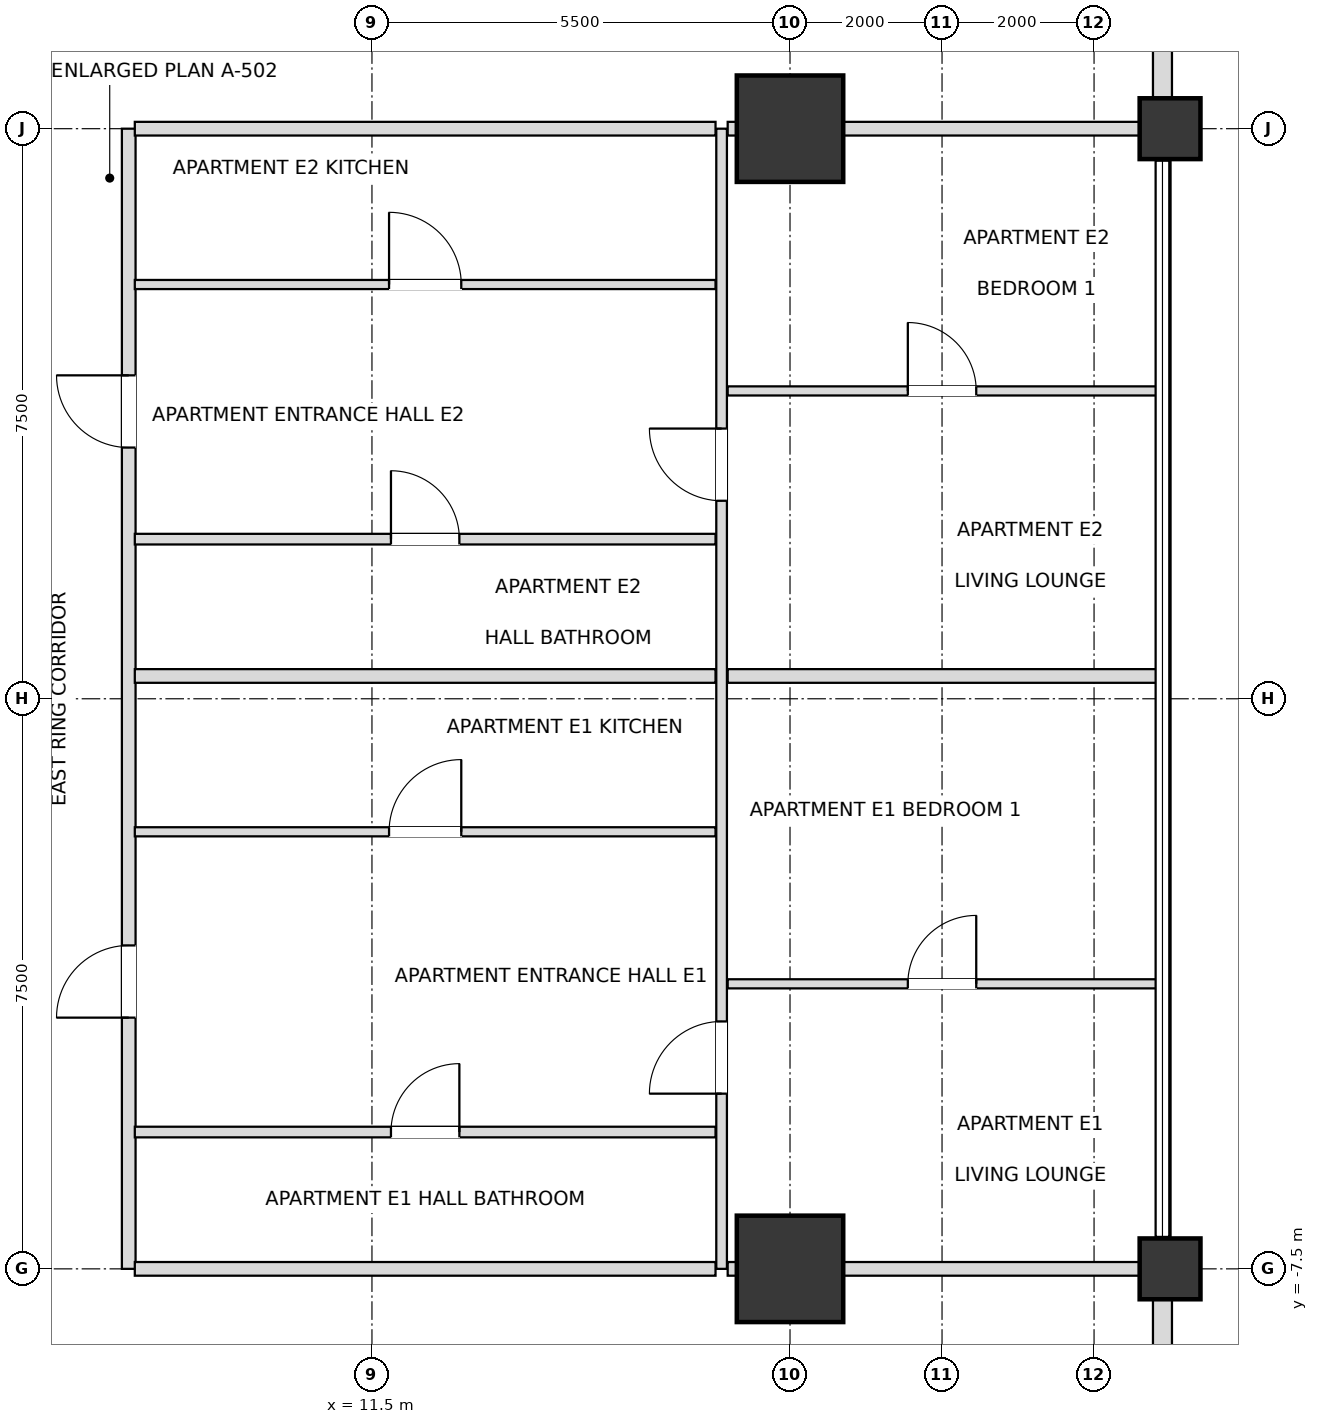
"""IFC4 building model, lengths in metres.
Left out: names, types, materials, properties, quantities, classifications, styles, units other than length and angle.
Written with IfcOpenShell. Run it as: python <this file> out.ifc"""

import sys

from ifc_helpers import new_model, si_unit, direction, frame, frame_2d, origin, origin_2d, place, context, subcontext, project, spatial, rectangle, extrude, element, fill, save


model = new_model("IFC4")
c1 = context("Model", 3, precision=1e-05, world=origin(), true_north=direction((0.0, 1.0)))
c2 = subcontext(c1, "Body", "Model", "MODEL_VIEW")
j1 = project(units=[si_unit("LENGTHUNIT", "METRE"), si_unit("PLANEANGLEUNIT", "RADIAN")], contexts=[c1])
p1 = place(None, origin())
s1 = spatial("IfcSite", under=j1, at=p1, CompositionType="ELEMENT")
p2 = place(p1, origin())
s2 = spatial("IfcBuilding", under=s1, at=p2, CompositionType="ELEMENT")
p3 = place(p2, frame((0.0, 0.0, 75.6)))
s3 = spatial("IfcBuildingStorey", under=s2, at=p3, CompositionType="ELEMENT", Elevation=75.6)
for number, where, z_axis, x_axis in (
    (1, (17.0, -7.5, 0.0), (0.0, 0.0, 1.0), (1.0, 0.0, 0.0)),
    (2, (17.0, 7.5, 0.0), (0.0, 0.0, 1.0), (1.0, 0.0, 0.0)),
):
    element("IfcColumn", number, at=place(p3, frame(where, z_axis=z_axis, x_axis=x_axis)), inside=s3, PredefinedType="USERDEFINED", context=c2, shape_type="SweptSolid", body=[
        extrude(rectangle(XDim=1.4, YDim=1.4, at=origin_2d()), origin(), (0.0, 0.0, 1.0), 3.6),
    ])
for number, where, z_axis, x_axis in (
    (3, (22.0, -7.5, 0.0), (0.0, 0.0, 1.0), (1.0, 0.0, 0.0)),
    (4, (22.0, 7.5, 0.0), (0.0, 0.0, 1.0), (1.0, 0.0, 0.0)),
):
    element("IfcColumn", number, at=place(p3, frame(where, z_axis=z_axis, x_axis=x_axis)), inside=s3, PredefinedType="COLUMN", context=c2, shape_type="SweptSolid", body=[
        extrude(rectangle(XDim=0.8, YDim=0.8, at=origin_2d()), origin(), (0.0, 0.0, 1.0), 3.6),
    ])
p4 = place(p3, frame((21.9, -12.605, 0.0), z_axis=(0.0, 0.0, 1.0), x_axis=(0.0, 1.0, 0.0)))
e5 = element("IfcWall", 5, at=p4, inside=s3, PredefinedType="SOLIDWALL", context=c2, shape_type="SweptSolid", body=[
    extrude(rectangle(XDim=4.71, YDim=0.25, at=frame_2d((2.355, 0.0))), origin(), (0.0, 0.0, 1.0), 2.736),
])
p5 = place(p4, frame((1.455, 0.0, 0.72)))
e6 = element("IfcOpeningElement", 6, at=p5, cuts=e5, PredefinedType="OPENING", context=c2, shape_type="SweptSolid", body=[
    extrude(rectangle(XDim=1.8, YDim=1.68, at=frame_2d((0.9, 0.84))), frame((0.0, 0.135, 0.0), z_axis=(0.0, -1.0, 0.0), x_axis=(1.0, 0.0, 0.0)), (0.0, 0.0, 1.0), 0.27),
])
p6 = place(p3, frame((21.9, 7.895, 0.0), z_axis=(0.0, 0.0, 1.0), x_axis=(0.0, 1.0, 0.0)))
e7 = element("IfcWall", 7, at=p6, inside=s3, PredefinedType="SOLIDWALL", context=c2, shape_type="SweptSolid", body=[
    extrude(rectangle(XDim=4.71, YDim=0.25, at=frame_2d((2.355, 0.0))), origin(), (0.0, 0.0, 1.0), 2.736),
])
p7 = place(p6, frame((1.455, 0.0, 0.72)))
e8 = element("IfcOpeningElement", 8, at=p7, cuts=e7, PredefinedType="OPENING", context=c2, shape_type="SweptSolid", body=[
    extrude(rectangle(XDim=1.8, YDim=1.68, at=frame_2d((0.9, 0.84))), frame((0.0, 0.135, 0.0), z_axis=(0.0, -1.0, 0.0), x_axis=(1.0, 0.0, 0.0)), (0.0, 0.0, 1.0), 0.27),
])
p8 = place(p3, frame((8.3, -7.5, 0.0), z_axis=(0.0, 0.0, 1.0), x_axis=(0.0, 1.0, 0.0)))
e9 = element("IfcWall", 9, at=p8, inside=s3, PredefinedType="PARTITIONING", context=c2, shape_type="SweptSolid", body=[
    extrude(rectangle(XDim=15.0, YDim=0.18, at=frame_2d((7.5, 0.0))), origin(), (0.0, 0.0, 1.0), 3.38),
])
p9 = place(p8, frame((3.305, 0.0, 0.0)))
e10 = element("IfcOpeningElement", 10, at=p9, cuts=e9, PredefinedType="OPENING", context=c2, shape_type="SweptSolid", body=[
    extrude(rectangle(XDim=0.95, YDim=2.15, at=frame_2d((0.475, 1.075))), frame((0.0, 0.1, 0.0), z_axis=(0.0, -1.0, 0.0), x_axis=(1.0, 0.0, 0.0)), (0.0, 0.0, 1.0), 0.2),
])
p10 = place(p8, frame((10.805, 0.0, 0.0)))
e11 = element("IfcOpeningElement", 11, at=p10, cuts=e9, PredefinedType="OPENING", context=c2, shape_type="SweptSolid", body=[
    extrude(rectangle(XDim=0.95, YDim=2.15, at=frame_2d((0.475, 1.075))), frame((0.0, 0.1, 0.0), z_axis=(0.0, -1.0, 0.0), x_axis=(1.0, 0.0, 0.0)), (0.0, 0.0, 1.0), 0.2),
])
p11 = place(p3, frame((16.1, -7.5, 0.0), z_axis=(0.0, 0.0, 1.0), x_axis=(0.0, 1.0, 0.0)))
e12 = element("IfcWall", 12, at=p11, inside=s3, PredefinedType="PARTITIONING", context=c2, shape_type="SweptSolid", body=[
    extrude(rectangle(XDim=15.0, YDim=0.14, at=frame_2d((7.5, 0.0))), origin(), (0.0, 0.0, 1.0), 3.38),
])
p12 = place(p11, frame((2.305, 0.0, 0.0)))
e13 = element("IfcOpeningElement", 13, at=p12, cuts=e12, PredefinedType="OPENING", context=c2, shape_type="SweptSolid", body=[
    extrude(rectangle(XDim=0.95, YDim=2.1, at=frame_2d((0.475, 1.05))), frame((0.0, 0.08, 0.0), z_axis=(0.0, -1.0, 0.0), x_axis=(1.0, 0.0, 0.0)), (0.0, 0.0, 1.0), 0.16),
])
p13 = place(p11, frame((10.105, 0.0, 0.0)))
e14 = element("IfcOpeningElement", 14, at=p13, cuts=e12, PredefinedType="OPENING", context=c2, shape_type="SweptSolid", body=[
    extrude(rectangle(XDim=0.95, YDim=2.1, at=frame_2d((0.475, 1.05))), frame((0.0, 0.08, 0.0), z_axis=(0.0, -1.0, 0.0), x_axis=(1.0, 0.0, 0.0)), (0.0, 0.0, 1.0), 0.16),
])
p14 = place(p3, frame((8.38, -7.5, 0.0), z_axis=(0.0, 0.0, 1.0), x_axis=(1.0, 0.0, 0.0)))
e15 = element("IfcWall", 15, at=p14, inside=s3, PredefinedType="PARTITIONING", context=c2, shape_type="SweptSolid", body=[
    extrude(rectangle(XDim=7.64, YDim=0.18, at=frame_2d((3.82, 0.0))), origin(), (0.0, 0.0, 1.0), 2.816),
])
p15 = place(p3, frame((16.18, -7.5, 0.0), z_axis=(0.0, 0.0, 1.0), x_axis=(1.0, 0.0, 0.0)))
e16 = element("IfcWall", 16, at=p15, inside=s3, PredefinedType="PARTITIONING", context=c2, shape_type="SweptSolid", body=[
    extrude(rectangle(XDim=5.72, YDim=0.18, at=frame_2d((2.86, 0.0))), origin(), (0.0, 0.0, 1.0), 2.816),
])
p16 = place(p3, frame((8.38, -5.7, 0.0), z_axis=(0.0, 0.0, 1.0), x_axis=(1.0, 0.0, 0.0)))
e17 = element("IfcWall", 17, at=p16, inside=s3, PredefinedType="PARTITIONING", context=c2, shape_type="SweptSolid", body=[
    extrude(rectangle(XDim=7.64, YDim=0.14, at=frame_2d((3.82, 0.0))), origin(), (0.0, 0.0, 1.0), 2.948),
])
p17 = place(p16, frame((3.37, 0.0, 0.0)))
e18 = element("IfcOpeningElement", 18, at=p17, cuts=e17, PredefinedType="OPENING", context=c2, shape_type="SweptSolid", body=[
    extrude(rectangle(XDim=0.9, YDim=2.1, at=frame_2d((0.45, 1.05))), frame((0.0, 0.08, 0.0), z_axis=(0.0, -1.0, 0.0), x_axis=(1.0, 0.0, 0.0)), (0.0, 0.0, 1.0), 0.16),
])
p18 = place(p3, frame((16.18, -3.75, 0.0), z_axis=(0.0, 0.0, 1.0), x_axis=(1.0, 0.0, 0.0)))
e19 = element("IfcWall", 19, at=p18, inside=s3, PredefinedType="PARTITIONING", context=c2, shape_type="SweptSolid", body=[
    extrude(rectangle(XDim=5.64, YDim=0.12, at=frame_2d((2.82, 0.0))), origin(), (0.0, 0.0, 1.0), 2.816),
])
p19 = place(p18, frame((2.37, 0.0, 0.0)))
e20 = element("IfcOpeningElement", 20, at=p19, cuts=e19, PredefinedType="OPENING", context=c2, shape_type="SweptSolid", body=[
    extrude(rectangle(XDim=0.9, YDim=2.1, at=frame_2d((0.45, 1.05))), frame((0.0, 0.07, 0.0), z_axis=(0.0, -1.0, 0.0), x_axis=(1.0, 0.0, 0.0)), (0.0, 0.0, 1.0), 0.14),
])
p20 = place(p3, frame((8.38, -1.75, 0.0), z_axis=(0.0, 0.0, 1.0), x_axis=(1.0, 0.0, 0.0)))
e21 = element("IfcWall", 21, at=p20, inside=s3, PredefinedType="PARTITIONING", context=c2, shape_type="SweptSolid", body=[
    extrude(rectangle(XDim=7.64, YDim=0.12, at=frame_2d((3.82, 0.0))), origin(), (0.0, 0.0, 1.0), 2.948),
])
p21 = place(p20, frame((3.345, 0.0, 0.0)))
e22 = element("IfcOpeningElement", 22, at=p21, cuts=e21, PredefinedType="OPENING", context=c2, shape_type="SweptSolid", body=[
    extrude(rectangle(XDim=0.95, YDim=2.1, at=frame_2d((0.475, 1.05))), frame((0.0, 0.07, 0.0), z_axis=(0.0, -1.0, 0.0), x_axis=(1.0, 0.0, 0.0)), (0.0, 0.0, 1.0), 0.14),
])
p22 = place(p3, frame((8.38, 0.3, 0.0), z_axis=(0.0, 0.0, 1.0), x_axis=(1.0, 0.0, 0.0)))
e23 = element("IfcWall", 23, at=p22, inside=s3, PredefinedType="PARTITIONING", context=c2, shape_type="SweptSolid", body=[
    extrude(rectangle(XDim=7.64, YDim=0.18, at=frame_2d((3.82, 0.0))), origin(), (0.0, 0.0, 1.0), 2.948),
])
p23 = place(p3, frame((16.18, 0.3, 0.0), z_axis=(0.0, 0.0, 1.0), x_axis=(1.0, 0.0, 0.0)))
e24 = element("IfcWall", 24, at=p23, inside=s3, PredefinedType="PARTITIONING", context=c2, shape_type="SweptSolid", body=[
    extrude(rectangle(XDim=5.64, YDim=0.18, at=frame_2d((2.82, 0.0))), origin(), (0.0, 0.0, 1.0), 2.816),
])
p24 = place(p3, frame((8.38, 2.1, 0.0), z_axis=(0.0, 0.0, 1.0), x_axis=(1.0, 0.0, 0.0)))
e25 = element("IfcWall", 25, at=p24, inside=s3, PredefinedType="PARTITIONING", context=c2, shape_type="SweptSolid", body=[
    extrude(rectangle(XDim=7.64, YDim=0.14, at=frame_2d((3.82, 0.0))), origin(), (0.0, 0.0, 1.0), 2.948),
])
p25 = place(p24, frame((3.37, 0.0, 0.0)))
e26 = element("IfcOpeningElement", 26, at=p25, cuts=e25, PredefinedType="OPENING", context=c2, shape_type="SweptSolid", body=[
    extrude(rectangle(XDim=0.9, YDim=2.1, at=frame_2d((0.45, 1.05))), frame((0.0, 0.08, 0.0), z_axis=(0.0, -1.0, 0.0), x_axis=(1.0, 0.0, 0.0)), (0.0, 0.0, 1.0), 0.16),
])
p26 = place(p3, frame((16.18, 4.05, 0.0), z_axis=(0.0, 0.0, 1.0), x_axis=(1.0, 0.0, 0.0)))
e27 = element("IfcWall", 27, at=p26, inside=s3, PredefinedType="PARTITIONING", context=c2, shape_type="SweptSolid", body=[
    extrude(rectangle(XDim=5.64, YDim=0.12, at=frame_2d((2.82, 0.0))), origin(), (0.0, 0.0, 1.0), 2.816),
])
p27 = place(p26, frame((2.37, 0.0, 0.0)))
e28 = element("IfcOpeningElement", 28, at=p27, cuts=e27, PredefinedType="OPENING", context=c2, shape_type="SweptSolid", body=[
    extrude(rectangle(XDim=0.9, YDim=2.1, at=frame_2d((0.45, 1.05))), frame((0.0, 0.07, 0.0), z_axis=(0.0, -1.0, 0.0), x_axis=(1.0, 0.0, 0.0)), (0.0, 0.0, 1.0), 0.14),
])
p28 = place(p3, frame((8.38, 5.45, 0.0), z_axis=(0.0, 0.0, 1.0), x_axis=(1.0, 0.0, 0.0)))
e29 = element("IfcWall", 29, at=p28, inside=s3, PredefinedType="PARTITIONING", context=c2, shape_type="SweptSolid", body=[
    extrude(rectangle(XDim=7.64, YDim=0.12, at=frame_2d((3.82, 0.0))), origin(), (0.0, 0.0, 1.0), 2.948),
])
p29 = place(p28, frame((3.345, 0.0, 0.0)))
e30 = element("IfcOpeningElement", 30, at=p29, cuts=e29, PredefinedType="OPENING", context=c2, shape_type="SweptSolid", body=[
    extrude(rectangle(XDim=0.95, YDim=2.1, at=frame_2d((0.475, 1.05))), frame((0.0, 0.07, 0.0), z_axis=(0.0, -1.0, 0.0), x_axis=(1.0, 0.0, 0.0)), (0.0, 0.0, 1.0), 0.14),
])
p30 = place(p3, frame((8.38, 7.5, 0.0), z_axis=(0.0, 0.0, 1.0), x_axis=(1.0, 0.0, 0.0)))
e31 = element("IfcWall", 31, at=p30, inside=s3, PredefinedType="PARTITIONING", context=c2, shape_type="SweptSolid", body=[
    extrude(rectangle(XDim=7.64, YDim=0.18, at=frame_2d((3.82, 0.0))), origin(), (0.0, 0.0, 1.0), 2.816),
])
p31 = place(p3, frame((16.18, 7.5, 0.0), z_axis=(0.0, 0.0, 1.0), x_axis=(1.0, 0.0, 0.0)))
e32 = element("IfcWall", 32, at=p31, inside=s3, PredefinedType="PARTITIONING", context=c2, shape_type="SweptSolid", body=[
    extrude(rectangle(XDim=5.72, YDim=0.18, at=frame_2d((2.86, 0.0))), origin(), (0.0, 0.0, 1.0), 2.816),
])
p32 = place(p17, origin())
e33 = element("IfcDoor", 33, at=p32, inside=s3, OperationType="SINGLE_SWING_RIGHT", PredefinedType="DOOR", context=c2, shape_type="SweptSolid", body=[
    extrude(rectangle(XDim=0.9, YDim=2.1, at=frame_2d((0.45, 1.05))), frame((0.0, 0.025, 0.0), z_axis=(0.0, -1.0, 0.0), x_axis=(1.0, 0.0, 0.0)), (0.0, 0.0, 1.0), 0.05),
])
fill(e18, e33)
p33 = place(p9, origin())
e34 = element("IfcDoor", 34, at=p33, inside=s3, OperationType="SINGLE_SWING_LEFT", PredefinedType="DOOR", context=c2, shape_type="SweptSolid", body=[
    extrude(rectangle(XDim=0.95, YDim=2.15, at=frame_2d((0.475, 1.075))), frame((0.0, 0.025, 0.0), z_axis=(0.0, -1.0, 0.0), x_axis=(1.0, 0.0, 0.0)), (0.0, 0.0, 1.0), 0.05),
])
fill(e10, e34)
p34 = place(p21, origin())
e35 = element("IfcDoor", 35, at=p34, inside=s3, OperationType="SINGLE_SWING_RIGHT", PredefinedType="DOOR", context=c2, shape_type="SweptSolid", body=[
    extrude(rectangle(XDim=0.95, YDim=2.1, at=frame_2d((0.475, 1.05))), frame((0.0, 0.025, 0.0), z_axis=(0.0, -1.0, 0.0), x_axis=(1.0, 0.0, 0.0)), (0.0, 0.0, 1.0), 0.05),
])
fill(e22, e35)
p35 = place(p12, origin())
e36 = element("IfcDoor", 36, at=p35, inside=s3, OperationType="SINGLE_SWING_LEFT", PredefinedType="DOOR", context=c2, shape_type="SweptSolid", body=[
    extrude(rectangle(XDim=0.95, YDim=2.1, at=frame_2d((0.475, 1.05))), frame((0.0, 0.025, 0.0), z_axis=(0.0, -1.0, 0.0), x_axis=(1.0, 0.0, 0.0)), (0.0, 0.0, 1.0), 0.05),
])
fill(e13, e36)
p36 = place(p19, origin())
e37 = element("IfcDoor", 37, at=p36, inside=s3, OperationType="SINGLE_SWING_RIGHT", PredefinedType="DOOR", context=c2, shape_type="SweptSolid", body=[
    extrude(rectangle(XDim=0.9, YDim=2.1, at=frame_2d((0.45, 1.05))), frame((0.0, 0.025, 0.0), z_axis=(0.0, -1.0, 0.0), x_axis=(1.0, 0.0, 0.0)), (0.0, 0.0, 1.0), 0.05),
])
fill(e20, e37)
p37 = place(p25, origin())
e38 = element("IfcDoor", 38, at=p37, inside=s3, OperationType="SINGLE_SWING_LEFT", PredefinedType="DOOR", context=c2, shape_type="SweptSolid", body=[
    extrude(rectangle(XDim=0.9, YDim=2.1, at=frame_2d((0.45, 1.05))), frame((0.0, 0.025, 0.0), z_axis=(0.0, -1.0, 0.0), x_axis=(1.0, 0.0, 0.0)), (0.0, 0.0, 1.0), 0.05),
])
fill(e26, e38)
p38 = place(p10, origin())
e39 = element("IfcDoor", 39, at=p38, inside=s3, OperationType="SINGLE_SWING_RIGHT", PredefinedType="DOOR", context=c2, shape_type="SweptSolid", body=[
    extrude(rectangle(XDim=0.95, YDim=2.15, at=frame_2d((0.475, 1.075))), frame((0.0, 0.025, 0.0), z_axis=(0.0, -1.0, 0.0), x_axis=(1.0, 0.0, 0.0)), (0.0, 0.0, 1.0), 0.05),
])
fill(e11, e39)
p39 = place(p29, origin())
e40 = element("IfcDoor", 40, at=p39, inside=s3, OperationType="SINGLE_SWING_LEFT", PredefinedType="DOOR", context=c2, shape_type="SweptSolid", body=[
    extrude(rectangle(XDim=0.95, YDim=2.1, at=frame_2d((0.475, 1.05))), frame((0.0, 0.025, 0.0), z_axis=(0.0, -1.0, 0.0), x_axis=(1.0, 0.0, 0.0)), (0.0, 0.0, 1.0), 0.05),
])
fill(e30, e40)
p40 = place(p13, origin())
e41 = element("IfcDoor", 41, at=p40, inside=s3, OperationType="SINGLE_SWING_RIGHT", PredefinedType="DOOR", context=c2, shape_type="SweptSolid", body=[
    extrude(rectangle(XDim=0.95, YDim=2.1, at=frame_2d((0.475, 1.05))), frame((0.0, 0.025, 0.0), z_axis=(0.0, -1.0, 0.0), x_axis=(1.0, 0.0, 0.0)), (0.0, 0.0, 1.0), 0.05),
])
fill(e14, e41)
p41 = place(p27, origin())
e42 = element("IfcDoor", 42, at=p41, inside=s3, OperationType="SINGLE_SWING_LEFT", PredefinedType="DOOR", context=c2, shape_type="SweptSolid", body=[
    extrude(rectangle(XDim=0.9, YDim=2.1, at=frame_2d((0.45, 1.05))), frame((0.0, 0.025, 0.0), z_axis=(0.0, -1.0, 0.0), x_axis=(1.0, 0.0, 0.0)), (0.0, 0.0, 1.0), 0.05),
])
fill(e28, e42)
save(model, sys.argv[1])
